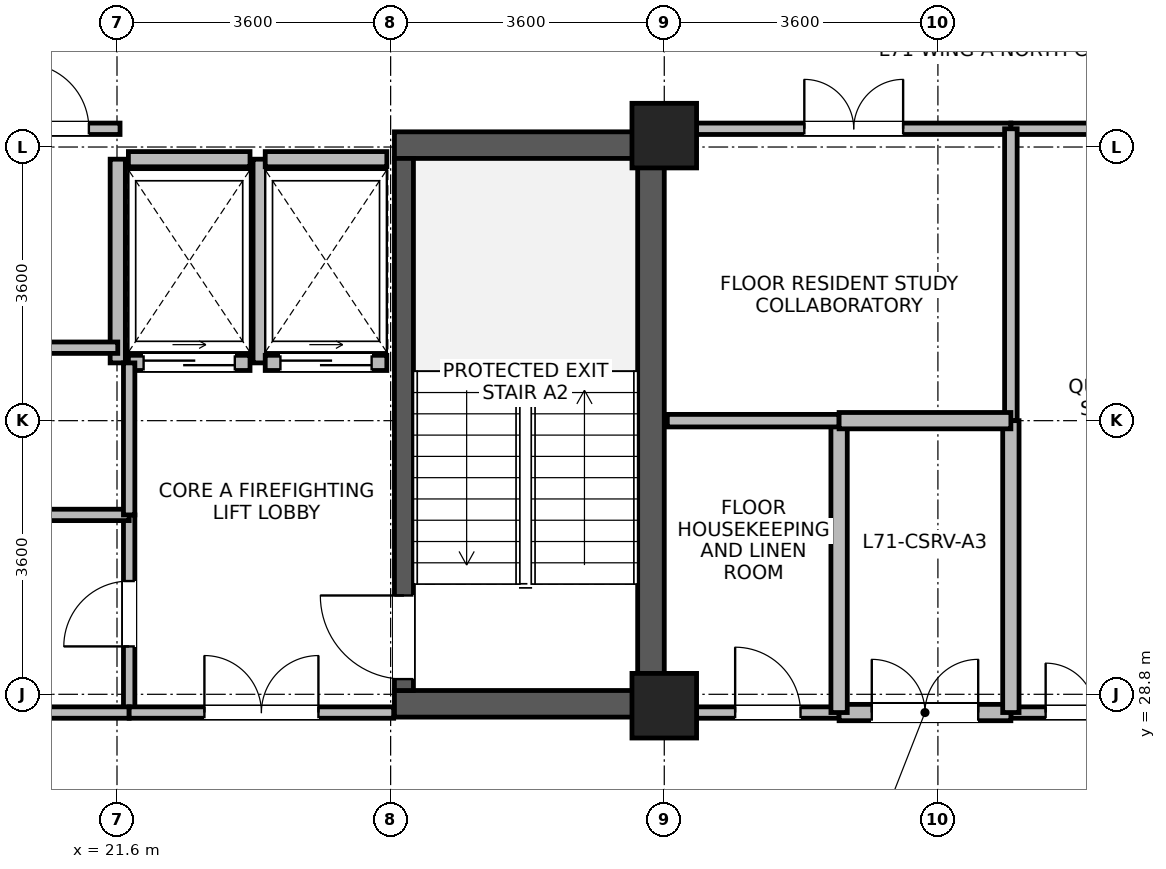
"""IFC4 building model, lengths in metres.
Left out: names, types, materials, properties, quantities, classifications, styles, units other than length and angle.
Written with IfcOpenShell. Run it as: python <this file> out.ifc"""

import sys

from ifc_helpers import new_model, si_unit, direction, frame, frame_2d, origin, origin_2d, place, context, subcontext, project, spatial, rectangle, extrude, source, transform, mapped, element, fill, save


model = new_model("IFC4")
c1 = context("Model", 3, precision=1e-05, world=origin(), true_north=direction((0.0, 1.0)))
c2 = subcontext(c1, "Body", "Model", "MODEL_VIEW")
j1 = project(units=[si_unit("LENGTHUNIT", "METRE"), si_unit("PLANEANGLEUNIT", "RADIAN")], contexts=[c1])
p1 = place(None, origin())
s1 = spatial("IfcSite", under=j1, at=p1, CompositionType="ELEMENT")
p2 = place(p1, origin())
s2 = spatial("IfcBuilding", under=s1, at=p2, CompositionType="ELEMENT")
p3 = place(p2, frame((0.0, 0.0, 275.8)))
s3 = spatial("IfcBuildingStorey", under=s2, at=p3, CompositionType="ELEMENT", Elevation=275.8)
p4 = place(p3, frame((28.625, 28.5, 0.0), z_axis=(0.0, 0.0, 1.0), x_axis=(0.0, 1.0, 0.0)))
e1 = element("IfcWall", 1, at=p4, inside=s3, PredefinedType="SHEAR", context=c2, shape_type="SweptSolid", body=[
    extrude(rectangle(XDim=7.7, YDim=0.35, at=frame_2d((3.85, 0.0))), origin(), (0.0, 0.0, 1.0), 3.475),
])
for number, where, z_axis, x_axis in (
    (2, (25.25, 28.675, 0.0), (0.0, 0.0, 1.0), (1.0, 0.0, 0.0)),
    (3, (25.25, 36.025, 0.0), (0.0, 0.0, 1.0), (1.0, 0.0, 0.0)),
):
    element("IfcWall", number, at=place(p3, frame(where, z_axis=z_axis, x_axis=x_axis)), inside=s3, PredefinedType="SHEAR", context=c2, shape_type="SweptSolid", body=[
        extrude(rectangle(XDim=3.2, YDim=0.35, at=frame_2d((1.6, 0.0))), origin(), (0.0, 0.0, 1.0), 3.475),
    ])
p5 = place(p3, frame((25.375, 28.85, 0.0), z_axis=(0.0, 0.0, 1.0), x_axis=(0.0, 1.0, 0.0)))
e4 = element("IfcWall", 4, at=p5, inside=s3, PredefinedType="SHEAR", context=c2, shape_type="SweptSolid", body=[
    extrude(rectangle(XDim=7.0, YDim=0.25, at=frame_2d((3.5, 0.0))), origin(), (0.0, 0.0, 1.0), 3.475),
])
p6 = place(p5, frame((0.15, 0.0, 0.0)))
e5 = element("IfcOpeningElement", 5, at=p6, cuts=e4, PredefinedType="OPENING", context=c2, shape_type="SweptSolid", body=[
    extrude(rectangle(XDim=1.1, YDim=2.08, at=frame_2d((0.55, 1.04))), frame((0.0, 0.135, 0.0), z_axis=(0.0, -1.0, 0.0), x_axis=(1.0, 0.0, 0.0)), (0.0, 0.0, 1.0), 0.27),
])
m1 = source(origin(), c2, "Body", "SweptSolid", [
    extrude(rectangle(XDim=0.85, YDim=0.85, at=origin_2d()), origin(), (0.0, 0.0, 1.0), 3.7),
])
for number, where, z_axis, x_axis in (
    (6, (28.8, 28.65, 0.0), (0.0, 0.0, 1.0), (1.0, 0.0, 0.0)),
    (7, (28.8, 36.15, 0.0), (0.0, 0.0, 1.0), (1.0, 0.0, 0.0)),
):
    element("IfcColumn", number, at=place(p3, frame(where, z_axis=z_axis, x_axis=x_axis)), inside=s3, PredefinedType="COLUMN", context=c2, shape_type="MappedRepresentation", body=[
        mapped(m1, transform((0.0, 0.0, 0.0), x_axis=(1.0, 0.0, 0.0), y_axis=(0.0, 1.0, 0.0), z_axis=(0.0, 0.0, 1.0), scale=1.0)),
    ])
p7 = place(p3, frame((21.75, 33.16, 0.0), z_axis=(0.0, 0.0, 1.0), x_axis=(1.0, 0.0, 0.0)))
e8 = element("IfcWall", 8, at=p7, inside=s3, PredefinedType="PARTITIONING", context=c2, shape_type="SweptSolid", body=[
    extrude(rectangle(XDim=1.6, YDim=0.2, at=frame_2d((0.8, 0.0))), origin(), (0.0, 0.0, 1.0), 3.455),
])
p8 = place(p7, frame((0.2, 0.0, 0.0)))
e9 = element("IfcOpeningElement", 9, at=p8, cuts=e8, PredefinedType="OPENING", context=c2, shape_type="SweptSolid", body=[
    extrude(rectangle(XDim=1.2, YDim=2.12, at=frame_2d((0.6, 1.06))), frame((0.0, 0.11, 0.0), z_axis=(0.0, -1.0, 0.0), x_axis=(1.0, 0.0, 0.0)), (0.0, 0.0, 1.0), 0.22),
])
p9 = place(p3, frame((21.75, 35.84, 0.0), z_axis=(0.0, 0.0, 1.0), x_axis=(1.0, 0.0, 0.0)))
e10 = element("IfcWall", 10, at=p9, inside=s3, PredefinedType="PARTITIONING", context=c2, shape_type="SweptSolid", body=[
    extrude(rectangle(XDim=1.6, YDim=0.2, at=frame_2d((0.8, 0.0))), origin(), (0.0, 0.0, 1.0), 2.555),
])
for number, where, z_axis, x_axis in (
    (11, (21.61, 33.16, 0.0), (0.0, 0.0, 1.0), (0.0, 1.0, 0.0)),
    (12, (23.49, 33.16, 0.0), (0.0, 0.0, 1.0), (0.0, 1.0, 0.0)),
):
    element("IfcWall", number, at=place(p3, frame(where, z_axis=z_axis, x_axis=x_axis)), inside=s3, PredefinedType="PARTITIONING", context=c2, shape_type="SweptSolid", body=[
        extrude(rectangle(XDim=2.68, YDim=0.2, at=frame_2d((1.34, 0.0))), origin(), (0.0, 0.0, 1.0), 3.455),
    ])
p10 = place(p3, frame((23.55, 33.16, 0.0), z_axis=(0.0, 0.0, 1.0), x_axis=(1.0, 0.0, 0.0)))
e13 = element("IfcWall", 13, at=p10, inside=s3, PredefinedType="PARTITIONING", context=c2, shape_type="SweptSolid", body=[
    extrude(rectangle(XDim=1.6, YDim=0.2, at=frame_2d((0.8, 0.0))), origin(), (0.0, 0.0, 1.0), 3.455),
])
p11 = place(p10, frame((0.2, 0.0, 0.0)))
e14 = element("IfcOpeningElement", 14, at=p11, cuts=e13, PredefinedType="OPENING", context=c2, shape_type="SweptSolid", body=[
    extrude(rectangle(XDim=1.2, YDim=2.12, at=frame_2d((0.6, 1.06))), frame((0.0, 0.11, 0.0), z_axis=(0.0, -1.0, 0.0), x_axis=(1.0, 0.0, 0.0)), (0.0, 0.0, 1.0), 0.22),
])
p12 = place(p3, frame((23.55, 35.84, 0.0), z_axis=(0.0, 0.0, 1.0), x_axis=(1.0, 0.0, 0.0)))
e15 = element("IfcWall", 15, at=p12, inside=s3, PredefinedType="PARTITIONING", context=c2, shape_type="SweptSolid", body=[
    extrude(rectangle(XDim=1.6, YDim=0.2, at=frame_2d((0.8, 0.0))), origin(), (0.0, 0.0, 1.0), 2.555),
])
p13 = place(p3, frame((29.225, 36.24, 0.0), z_axis=(0.0, 0.0, 1.0), x_axis=(1.0, 0.0, 0.0)))
e16 = element("IfcWall", 16, at=p13, inside=s3, PredefinedType="PARTITIONING", context=c2, shape_type="SweptSolid", body=[
    extrude(rectangle(XDim=4.135, YDim=0.15, at=frame_2d((2.067, 0.0))), origin(), (0.0, 0.0, 1.0), 2.905),
])
p14 = place(p13, frame((1.417, 0.0, 0.0)))
e17 = element("IfcOpeningElement", 17, at=p14, cuts=e16, PredefinedType="OPENING", context=c2, shape_type="SweptSolid", body=[
    extrude(rectangle(XDim=1.3, YDim=2.12, at=frame_2d((0.65, 1.06))), frame((0.0, 0.085, 0.0), z_axis=(0.0, -1.0, 0.0), x_axis=(1.0, 0.0, 0.0)), (0.0, 0.0, 1.0), 0.17),
])
p15 = place(p3, frame((33.36, 28.56, 0.0), z_axis=(0.0, 0.0, 1.0), x_axis=(1.0, 0.0, 0.0)))
e18 = element("IfcWall", 18, at=p15, inside=s3, PredefinedType="PARTITIONING", context=c2, shape_type="SweptSolid", body=[
    extrude(rectangle(XDim=2.215, YDim=0.15, at=frame_2d((1.107, 0.0))), origin(), (0.0, 0.0, 1.0), 2.905),
])
p16 = place(p15, frame((0.458, 0.0, 0.0)))
e19 = element("IfcOpeningElement", 19, at=p16, cuts=e18, PredefinedType="OPENING", context=c2, shape_type="SweptSolid", body=[
    extrude(rectangle(XDim=1.3, YDim=2.12, at=frame_2d((0.65, 1.06))), frame((0.0, 0.085, 0.0), z_axis=(0.0, -1.0, 0.0), x_axis=(1.0, 0.0, 0.0)), (0.0, 0.0, 1.0), 0.17),
])
p17 = place(p3, frame((33.36, 36.24, 0.0), z_axis=(0.0, 0.0, 1.0), x_axis=(1.0, 0.0, 0.0)))
e20 = element("IfcWall", 20, at=p17, inside=s3, PredefinedType="PARTITIONING", context=c2, shape_type="SweptSolid", body=[
    extrude(rectangle(XDim=2.215, YDim=0.15, at=frame_2d((1.107, 0.0))), origin(), (0.0, 0.0, 1.0), 2.905),
])
p18 = place(p3, frame((21.76, 28.56, 0.0), z_axis=(0.0, 0.0, 1.0), x_axis=(0.0, 1.0, 0.0)))
e21 = element("IfcWall", 21, at=p18, inside=s3, PredefinedType="PARTITIONING", context=c2, shape_type="SweptSolid", body=[
    extrude(rectangle(XDim=2.6, YDim=0.15, at=frame_2d((1.3, 0.0))), origin(), (0.0, 0.0, 1.0), 3.455),
])
p19 = place(p18, frame((0.87, 0.0, 0.0)))
e22 = element("IfcOpeningElement", 22, at=p19, cuts=e21, PredefinedType="OPENING", context=c2, shape_type="SweptSolid", body=[
    extrude(rectangle(XDim=0.86, YDim=2.02, at=frame_2d((0.43, 1.01))), frame((0.0, 0.085, 0.0), z_axis=(0.0, -1.0, 0.0), x_axis=(1.0, 0.0, 0.0)), (0.0, 0.0, 1.0), 0.17),
])
p20 = place(p3, frame((29.225, 28.56, 0.0), z_axis=(0.0, 0.0, 1.0), x_axis=(1.0, 0.0, 0.0)))
e23 = element("IfcWall", 23, at=p20, inside=s3, PredefinedType="PARTITIONING", context=c2, shape_type="SweptSolid", body=[
    extrude(rectangle(XDim=1.875, YDim=0.15, at=frame_2d((0.938, 0.0))), origin(), (0.0, 0.0, 1.0), 2.905),
])
p21 = place(p20, frame((0.508, 0.0, 0.0)))
e24 = element("IfcOpeningElement", 24, at=p21, cuts=e23, PredefinedType="OPENING", context=c2, shape_type="SweptSolid", body=[
    extrude(rectangle(XDim=0.86, YDim=2.02, at=frame_2d((0.43, 1.01))), frame((0.0, 0.085, 0.0), z_axis=(0.0, -1.0, 0.0), x_axis=(1.0, 0.0, 0.0)), (0.0, 0.0, 1.0), 0.17),
])
p22 = place(p3, frame((31.1, 28.56, 0.0), z_axis=(0.0, 0.0, 1.0), x_axis=(1.0, 0.0, 0.0)))
e25 = element("IfcWall", 25, at=p22, inside=s3, PredefinedType="PARTITIONING", context=c2, shape_type="SweptSolid", body=[
    extrude(rectangle(XDim=2.26, YDim=0.215, at=frame_2d((1.13, 0.0))), origin(), (0.0, 0.0, 1.0), 2.905),
])
p23 = place(p22, frame((0.43, 0.0, 0.0)))
e26 = element("IfcOpeningElement", 26, at=p23, cuts=e25, PredefinedType="OPENING", context=c2, shape_type="SweptSolid", body=[
    extrude(rectangle(XDim=1.4, YDim=2.15, at=frame_2d((0.7, 1.075))), frame((0.0, 0.118, 0.0), z_axis=(0.0, -1.0, 0.0), x_axis=(1.0, 0.0, 0.0)), (0.0, 0.0, 1.0), 0.235),
])
p24 = place(p3, frame((19.96, 33.36, 0.0), z_axis=(0.0, 0.0, 1.0), x_axis=(1.0, 0.0, 0.0)))
e27 = element("IfcWall", 27, at=p24, inside=s3, PredefinedType="PARTITIONING", context=c2, shape_type="SweptSolid", body=[
    extrude(rectangle(XDim=1.65, YDim=0.15, at=frame_2d((0.825, 0.0))), origin(), (0.0, 0.0, 1.0), 3.455),
])
p25 = place(p3, frame((19.96, 36.24, 0.0), z_axis=(0.0, 0.0, 1.0), x_axis=(1.0, 0.0, 0.0)))
e28 = element("IfcWall", 28, at=p25, inside=s3, PredefinedType="PARTITIONING", context=c2, shape_type="SweptSolid", body=[
    extrude(rectangle(XDim=1.68, YDim=0.15, at=frame_2d((0.84, 0.0))), origin(), (0.0, 0.0, 1.0), 2.555),
])
p26 = place(p25, frame((0.41, 0.0, 0.0)))
e29 = element("IfcOpeningElement", 29, at=p26, cuts=e28, PredefinedType="OPENING", context=c2, shape_type="SweptSolid", body=[
    extrude(rectangle(XDim=0.86, YDim=2.02, at=frame_2d((0.43, 1.01))), frame((0.0, 0.085, 0.0), z_axis=(0.0, -1.0, 0.0), x_axis=(1.0, 0.0, 0.0)), (0.0, 0.0, 1.0), 0.17),
])
p27 = place(p3, frame((20.56, 28.56, 0.0), z_axis=(0.0, 0.0, 1.0), x_axis=(1.0, 0.0, 0.0)))
e30 = element("IfcWall", 30, at=p27, inside=s3, PredefinedType="PARTITIONING", context=c2, shape_type="SweptSolid", body=[
    extrude(rectangle(XDim=1.2, YDim=0.15, at=frame_2d((0.6, 0.0))), origin(), (0.0, 0.0, 1.0), 2.555),
])
p28 = place(p3, frame((20.56, 31.16, 0.0), z_axis=(0.0, 0.0, 1.0), x_axis=(1.0, 0.0, 0.0)))
e31 = element("IfcWall", 31, at=p28, inside=s3, PredefinedType="PARTITIONING", context=c2, shape_type="SweptSolid", body=[
    extrude(rectangle(XDim=1.2, YDim=0.15, at=frame_2d((0.6, 0.0))), origin(), (0.0, 0.0, 1.0), 3.455),
])
p29 = place(p3, frame((33.36, 32.4, 0.0), z_axis=(0.0, 0.0, 1.0), x_axis=(0.0, 1.0, 0.0)))
e32 = element("IfcWall", 32, at=p29, inside=s3, PredefinedType="PARTITIONING", context=c2, shape_type="SweptSolid", body=[
    extrude(rectangle(XDim=3.84, YDim=0.165, at=frame_2d((1.92, 0.0))), origin(), (0.0, 0.0, 1.0), 3.455),
])
for number, where, z_axis, x_axis in (
    (33, (31.1, 28.56, 0.0), (0.0, 0.0, 1.0), (0.0, 1.0, 0.0)),
    (34, (33.36, 28.56, 0.0), (0.0, 0.0, 1.0), (0.0, 1.0, 0.0)),
):
    element("IfcWall", number, at=place(p3, frame(where, z_axis=z_axis, x_axis=x_axis)), inside=s3, PredefinedType="PARTITIONING", context=c2, shape_type="SweptSolid", body=[
        extrude(rectangle(XDim=3.84, YDim=0.215, at=frame_2d((1.92, 0.0))), origin(), (0.0, 0.0, 1.0), 3.455),
    ])
p30 = place(p3, frame((21.76, 28.56, 0.0), z_axis=(0.0, 0.0, 1.0), x_axis=(1.0, 0.0, 0.0)))
e35 = element("IfcWall", 35, at=p30, inside=s3, PredefinedType="PARTITIONING", context=c2, shape_type="SweptSolid", body=[
    extrude(rectangle(XDim=3.48, YDim=0.15, at=frame_2d((1.74, 0.0))), origin(), (0.0, 0.0, 1.0), 2.555),
])
p31 = place(p30, frame((0.99, 0.0, 0.0)))
e36 = element("IfcOpeningElement", 36, at=p31, cuts=e35, PredefinedType="OPENING", context=c2, shape_type="SweptSolid", body=[
    extrude(rectangle(XDim=1.5, YDim=2.1, at=frame_2d((0.75, 1.05))), frame((0.0, 0.085, 0.0), z_axis=(0.0, -1.0, 0.0), x_axis=(1.0, 0.0, 0.0)), (0.0, 0.0, 1.0), 0.17),
])
p32 = place(p3, frame((28.84, 32.4, 0.0), z_axis=(0.0, 0.0, 1.0), x_axis=(1.0, 0.0, 0.0)))
e37 = element("IfcWall", 37, at=p32, inside=s3, PredefinedType="PARTITIONING", context=c2, shape_type="SweptSolid", body=[
    extrude(rectangle(XDim=2.26, YDim=0.165, at=frame_2d((1.13, 0.0))), origin(), (0.0, 0.0, 1.0), 3.455),
])
p33 = place(p3, frame((31.1, 32.4, 0.0), z_axis=(0.0, 0.0, 1.0), x_axis=(1.0, 0.0, 0.0)))
e38 = element("IfcWall", 38, at=p33, inside=s3, PredefinedType="PARTITIONING", context=c2, shape_type="SweptSolid", body=[
    extrude(rectangle(XDim=2.26, YDim=0.215, at=frame_2d((1.13, 0.0))), origin(), (0.0, 0.0, 1.0), 3.455),
])
p34 = place(p3, frame((21.76, 31.16, 0.0), z_axis=(0.0, 0.0, 1.0), x_axis=(0.0, 1.0, 0.0)))
e39 = element("IfcWall", 39, at=p34, inside=s3, PredefinedType="PARTITIONING", context=c2, shape_type="SweptSolid", body=[
    extrude(rectangle(XDim=2.0, YDim=0.15, at=frame_2d((1.0, 0.0))), origin(), (0.0, 0.0, 1.0), 3.455),
])
p35 = place(p6, origin())
e40 = element("IfcDoor", 40, at=p35, inside=s3, OperationType="SINGLE_SWING_RIGHT", PredefinedType="DOOR", context=c2, shape_type="SweptSolid", body=[
    extrude(rectangle(XDim=1.1, YDim=2.08, at=frame_2d((0.55, 1.04))), frame((0.0, 0.025, 0.0), z_axis=(0.0, -1.0, 0.0), x_axis=(1.0, 0.0, 0.0)), (0.0, 0.0, 1.0), 0.05),
])
fill(e5, e40)
p36 = place(p8, origin())
e41 = element("IfcDoor", 41, at=p36, inside=s3, OperationType="SLIDING_TO_RIGHT", PredefinedType="DOOR", context=c2, shape_type="SweptSolid", body=[
    extrude(rectangle(XDim=1.2, YDim=2.12, at=frame_2d((0.6, 1.06))), frame((0.0, 0.025, 0.0), z_axis=(0.0, -1.0, 0.0), x_axis=(1.0, 0.0, 0.0)), (0.0, 0.0, 1.0), 0.05),
])
fill(e9, e41)
p37 = place(p11, origin())
e42 = element("IfcDoor", 42, at=p37, inside=s3, OperationType="SLIDING_TO_RIGHT", PredefinedType="DOOR", context=c2, shape_type="SweptSolid", body=[
    extrude(rectangle(XDim=1.2, YDim=2.12, at=frame_2d((0.6, 1.06))), frame((0.0, 0.025, 0.0), z_axis=(0.0, -1.0, 0.0), x_axis=(1.0, 0.0, 0.0)), (0.0, 0.0, 1.0), 0.05),
])
fill(e14, e42)
p38 = place(p14, origin())
e43 = element("IfcDoor", 43, at=p38, inside=s3, OperationType="DOUBLE_DOOR_SINGLE_SWING", PredefinedType="DOOR", context=c2, shape_type="SweptSolid", body=[
    extrude(rectangle(XDim=1.3, YDim=2.12, at=frame_2d((0.65, 1.06))), frame((0.0, 0.025, 0.0), z_axis=(0.0, -1.0, 0.0), x_axis=(1.0, 0.0, 0.0)), (0.0, 0.0, 1.0), 0.05),
])
fill(e17, e43)
p39 = place(p16, origin())
e44 = element("IfcDoor", 44, at=p39, inside=s3, OperationType="DOUBLE_DOOR_SINGLE_SWING", PredefinedType="DOOR", context=c2, shape_type="SweptSolid", body=[
    extrude(rectangle(XDim=1.3, YDim=2.12, at=frame_2d((0.65, 1.06))), frame((0.0, 0.025, 0.0), z_axis=(0.0, -1.0, 0.0), x_axis=(1.0, 0.0, 0.0)), (0.0, 0.0, 1.0), 0.05),
])
fill(e19, e44)
p40 = place(p19, origin())
e45 = element("IfcDoor", 45, at=p40, inside=s3, OperationType="SINGLE_SWING_LEFT", PredefinedType="DOOR", context=c2, shape_type="SweptSolid", body=[
    extrude(rectangle(XDim=0.86, YDim=2.02, at=frame_2d((0.43, 1.01))), frame((0.0, 0.025, 0.0), z_axis=(0.0, -1.0, 0.0), x_axis=(1.0, 0.0, 0.0)), (0.0, 0.0, 1.0), 0.05),
])
fill(e22, e45)
p41 = place(p21, origin())
e46 = element("IfcDoor", 46, at=p41, inside=s3, OperationType="SINGLE_SWING_LEFT", PredefinedType="DOOR", context=c2, shape_type="SweptSolid", body=[
    extrude(rectangle(XDim=0.86, YDim=2.02, at=frame_2d((0.43, 1.01))), frame((0.0, 0.025, 0.0), z_axis=(0.0, -1.0, 0.0), x_axis=(1.0, 0.0, 0.0)), (0.0, 0.0, 1.0), 0.05),
])
fill(e24, e46)
p42 = place(p23, origin())
e47 = element("IfcDoor", 47, at=p42, inside=s3, OperationType="DOUBLE_DOOR_SINGLE_SWING", PredefinedType="DOOR", context=c2, shape_type="SweptSolid", body=[
    extrude(rectangle(XDim=1.4, YDim=2.15, at=frame_2d((0.7, 1.075))), frame((0.0, 0.025, 0.0), z_axis=(0.0, -1.0, 0.0), x_axis=(1.0, 0.0, 0.0)), (0.0, 0.0, 1.0), 0.05),
])
fill(e26, e47)
p43 = place(p26, origin())
e48 = element("IfcDoor", 48, at=p43, inside=s3, OperationType="SINGLE_SWING_LEFT", PredefinedType="DOOR", context=c2, shape_type="SweptSolid", body=[
    extrude(rectangle(XDim=0.86, YDim=2.02, at=frame_2d((0.43, 1.01))), frame((0.0, 0.025, 0.0), z_axis=(0.0, -1.0, 0.0), x_axis=(1.0, 0.0, 0.0)), (0.0, 0.0, 1.0), 0.05),
])
fill(e29, e48)
p44 = place(p31, origin())
e49 = element("IfcDoor", 49, at=p44, inside=s3, OperationType="DOUBLE_DOOR_SINGLE_SWING", PredefinedType="DOOR", context=c2, shape_type="SweptSolid", body=[
    extrude(rectangle(XDim=1.5, YDim=2.1, at=frame_2d((0.75, 1.05))), frame((0.0, 0.025, 0.0), z_axis=(0.0, -1.0, 0.0), x_axis=(1.0, 0.0, 0.0)), (0.0, 0.0, 1.0), 0.05),
])
fill(e36, e49)
save(model, sys.argv[1])
